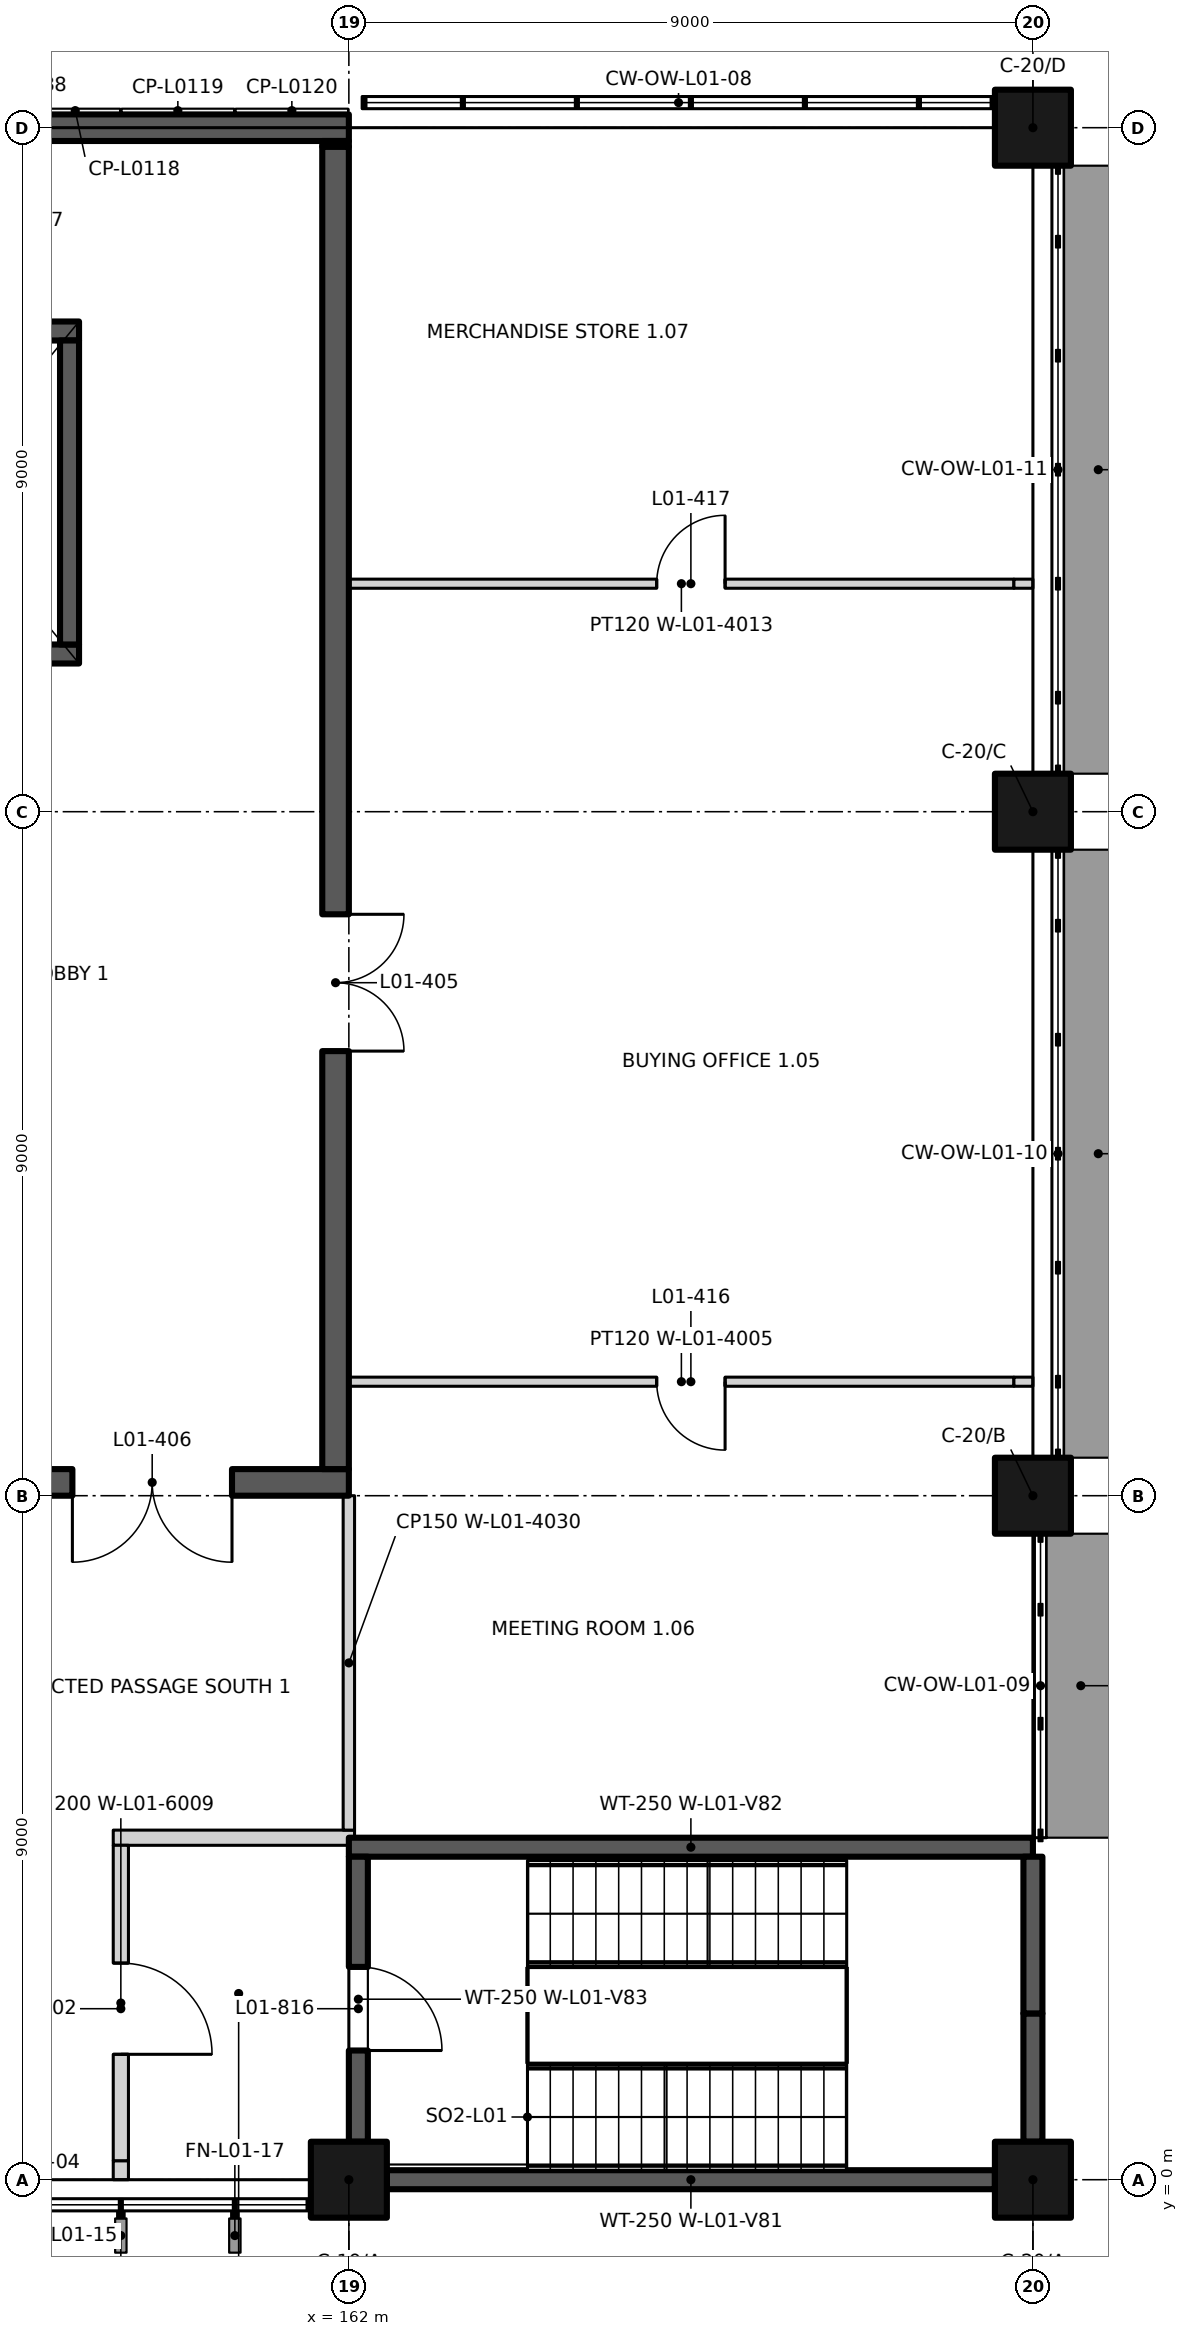
"""IFC4 building model, lengths in metres.
Left out: names, types, materials, properties, quantities, classifications, styles, units other than length and angle.
Written with IfcOpenShell. Run it as: python <this file> out.ifc"""

import sys

from ifc_helpers import new_model, si_unit, direction, frame, frame_2d, origin, origin_2d, place, context, subcontext, project, spatial, rectangle, extrude, element, fill, save


model = new_model("IFC4")
c1 = context("Model", 3, precision=1e-05, world=origin(), true_north=direction((0.0, 1.0)))
c2 = subcontext(c1, "Body", "Model", "MODEL_VIEW")
j1 = project(units=[si_unit("LENGTHUNIT", "METRE"), si_unit("PLANEANGLEUNIT", "RADIAN")], contexts=[c1])
p1 = place(None, origin())
s1 = spatial("IfcSite", under=j1, at=p1, CompositionType="ELEMENT")
p2 = place(p1, origin())
s2 = spatial("IfcBuilding", under=s1, at=p2, CompositionType="ELEMENT")
p3 = place(p2, frame((0.0, 0.0, 6.0)))
s3 = spatial("IfcBuildingStorey", under=s2, at=p3, CompositionType="ELEMENT", Elevation=6.0)
for number, where, z_axis, x_axis in (
    (1, (162.0, 0.0, 0.0), (0.0, 0.0, 1.0), (1.0, 0.0, 0.0)),
    (2, (171.0, 0.0, 0.0), (0.0, 0.0, 1.0), (1.0, 0.0, 0.0)),
    (3, (171.0, 9.0, 0.0), (0.0, 0.0, 1.0), (1.0, 0.0, 0.0)),
    (4, (171.0, 18.0, 0.0), (0.0, 0.0, 1.0), (1.0, 0.0, 0.0)),
    (5, (171.0, 27.0, 0.0), (0.0, 0.0, 1.0), (1.0, 0.0, 0.0)),
):
    element("IfcColumn", number, at=place(p3, frame(where, z_axis=z_axis, x_axis=x_axis)), inside=s3, PredefinedType="COLUMN", context=c2, shape_type="SweptSolid", body=[
        extrude(rectangle(XDim=1.0, YDim=1.0, at=origin_2d()), origin(), (0.0, 0.0, 1.0), 4.5),
    ])
p4 = place(p3, frame((162.5, 0.0, 0.0), z_axis=(0.0, 0.0, 1.0), x_axis=(1.0, 0.0, 0.0)))
e6 = element("IfcWall", 6, at=p4, inside=s3, PredefinedType="SHEAR", context=c2, shape_type="SweptSolid", body=[
    extrude(rectangle(XDim=8.0, YDim=0.25, at=frame_2d((4.0, 0.0))), origin(), (0.0, 0.0, 1.0), 4.5),
])
p5 = place(p3, frame((162.0, 4.375, 0.0), z_axis=(0.0, 0.0, 1.0), x_axis=(1.0, 0.0, 0.0)))
e7 = element("IfcWall", 7, at=p5, inside=s3, PredefinedType="SHEAR", context=c2, shape_type="SweptSolid", body=[
    extrude(rectangle(XDim=9.0, YDim=0.25, at=frame_2d((4.5, 0.0))), origin(), (0.0, 0.0, 1.0), 4.5),
])
p6 = place(p3, frame((162.125, 0.5, 0.0), z_axis=(0.0, 0.0, 1.0), x_axis=(0.0, 1.0, 0.0)))
e8 = element("IfcWall", 8, at=p6, inside=s3, PredefinedType="SHEAR", context=c2, shape_type="SweptSolid", body=[
    extrude(rectangle(XDim=3.75, YDim=0.25, at=frame_2d((1.875, 0.0))), origin(), (0.0, 0.0, 1.0), 4.5),
])
p7 = place(p6, frame((2.3, 0.0, 0.0), z_axis=(0.0, 0.0, 1.0), x_axis=(-1.0, 0.0, 0.0)))
e9 = element("IfcOpeningElement", 9, at=p7, cuts=e8, PredefinedType="OPENING", context=c2, shape_type="SweptSolid", body=[
    extrude(rectangle(XDim=1.1, YDim=2.1, at=frame_2d((0.55, 1.05))), frame((0.0, 0.135, 0.0), z_axis=(0.0, -1.0, 0.0), x_axis=(1.0, 0.0, 0.0)), (0.0, 0.0, 1.0), 0.27),
])
p8 = place(p3, frame((171.0, 0.5, 0.0), z_axis=(0.0, 0.0, 1.0), x_axis=(0.0, 1.0, 0.0)))
e10 = element("IfcWall", 10, at=p8, inside=s3, PredefinedType="SHEAR", context=c2, shape_type="SweptSolid", body=[
    extrude(rectangle(XDim=1.688, YDim=0.25, at=frame_2d((0.844, 0.0))), origin(), (0.0, 0.0, 1.0), 4.5),
])
p9 = place(p3, frame((171.0, 2.188, 0.0), z_axis=(0.0, 0.0, 1.0), x_axis=(0.0, 1.0, 0.0)))
e11 = element("IfcWall", 11, at=p9, inside=s3, PredefinedType="SHEAR", context=c2, shape_type="SweptSolid", body=[
    extrude(rectangle(XDim=2.062, YDim=0.25, at=frame_2d((1.031, 0.0))), origin(), (0.0, 0.0, 1.0), 4.5),
])
p10 = place(p3, frame((154.75, 20.075, 0.0), z_axis=(0.0, 0.0, 1.0), x_axis=(1.0, 0.0, 0.0)))
e12 = element("IfcWall", 12, at=p10, inside=s3, PredefinedType="SHEAR", context=c2, shape_type="SweptSolid", body=[
    extrude(rectangle(XDim=3.7, YDim=0.25, at=frame_2d((1.85, 0.0))), origin(), (0.0, 0.0, 1.0), 4.5),
])
p11 = place(p10, frame((1.15, 0.0, 0.0)))
e13 = element("IfcOpeningElement", 13, at=p11, cuts=e12, PredefinedType="OPENING", context=c2, shape_type="SweptSolid", body=[
    extrude(rectangle(XDim=1.4, YDim=2.1, at=frame_2d((0.7, 1.05))), frame((0.0, 0.135, 0.0), z_axis=(0.0, -1.0, 0.0), x_axis=(1.0, 0.0, 0.0)), (0.0, 0.0, 1.0), 0.27),
])
p12 = place(p3, frame((154.75, 24.325, 0.0), z_axis=(0.0, 0.0, 1.0), x_axis=(1.0, 0.0, 0.0)))
e14 = element("IfcWall", 14, at=p12, inside=s3, PredefinedType="SHEAR", context=c2, shape_type="SweptSolid", body=[
    extrude(rectangle(XDim=3.7, YDim=0.25, at=frame_2d((1.85, 0.0))), origin(), (0.0, 0.0, 1.0), 4.5),
])
p13 = place(p3, frame((158.325, 20.2, 0.0), z_axis=(0.0, 0.0, 1.0), x_axis=(0.0, 1.0, 0.0)))
e15 = element("IfcWall", 15, at=p13, inside=s3, PredefinedType="SHEAR", context=c2, shape_type="SweptSolid", body=[
    extrude(rectangle(XDim=4.0, YDim=0.25, at=frame_2d((2.0, 0.0))), origin(), (0.0, 0.0, 1.0), 4.5),
])
p14 = place(p3, frame((144.0, 27.0, 0.0), z_axis=(0.0, 0.0, 1.0), x_axis=(1.0, 0.0, 0.0)))
e16 = element("IfcWall", 16, at=p14, inside=s3, PredefinedType="SOLIDWALL", context=c2, shape_type="SweptSolid", body=[
    extrude(rectangle(XDim=18.0, YDim=0.35, at=frame_2d((9.0, 0.0))), origin(), (0.0, 0.0, 1.0), 3.6),
])
p15 = place(p14, frame((4.2, 0.0, 0.6)))
e17 = element("IfcOpeningElement", 17, at=p15, cuts=e16, PredefinedType="OPENING", context=c2, shape_type="SweptSolid", body=[
    extrude(rectangle(XDim=0.6, YDim=2.4, at=frame_2d((0.3, 1.2))), frame((0.0, 0.185, 0.0), z_axis=(0.0, -1.0, 0.0), x_axis=(1.0, 0.0, 0.0)), (0.0, 0.0, 1.0), 0.37),
])
p16 = place(p14, frame((13.2, 0.0, 0.6)))
e18 = element("IfcOpeningElement", 18, at=p16, cuts=e16, PredefinedType="OPENING", context=c2, shape_type="SweptSolid", body=[
    extrude(rectangle(XDim=0.6, YDim=2.4, at=frame_2d((0.3, 1.2))), frame((0.0, 0.185, 0.0), z_axis=(0.0, -1.0, 0.0), x_axis=(1.0, 0.0, 0.0)), (0.0, 0.0, 1.0), 0.37),
])
p17 = place(p3, frame((158.9, 4.5, 0.0), z_axis=(0.0, 0.0, 1.0), x_axis=(1.0, 0.0, 0.0)))
e19 = element("IfcWall", 19, at=p17, inside=s3, PredefinedType="PARTITIONING", context=c2, shape_type="SweptSolid", body=[
    extrude(rectangle(XDim=3.175, YDim=0.2, at=frame_2d((1.587, 0.0))), origin(), (0.0, 0.0, 1.0), 4.2),
])
p18 = place(p3, frame((144.0, 9.175, 0.0), z_axis=(0.0, 0.0, 1.0), x_axis=(1.0, 0.0, 0.0)))
e20 = element("IfcWall", 20, at=p18, inside=s3, PredefinedType="SHEAR", context=c2, shape_type="SweptSolid", body=[
    extrude(rectangle(XDim=18.0, YDim=0.35, at=frame_2d((9.0, 0.0))), origin(), (0.0, 0.0, 1.0), 4.2),
])
p19 = place(p18, frame((16.463, 0.0, 0.0), z_axis=(0.0, 0.0, 1.0), x_axis=(-1.0, 0.0, 0.0)))
e21 = element("IfcOpeningElement", 21, at=p19, cuts=e20, PredefinedType="OPENING", context=c2, shape_type="SweptSolid", body=[
    extrude(rectangle(XDim=2.1, YDim=2.4, at=frame_2d((1.05, 1.2))), frame((0.0, 0.185, 0.0), z_axis=(0.0, -1.0, 0.0), x_axis=(1.0, 0.0, 0.0)), (0.0, 0.0, 1.0), 0.37),
])
p20 = place(p3, frame((162.0, 10.5, 0.0), z_axis=(0.0, 0.0, 1.0), x_axis=(1.0, 0.0, 0.0)))
e22 = element("IfcWall", 22, at=p20, inside=s3, PredefinedType="PARTITIONING", context=c2, shape_type="SweptSolid", body=[
    extrude(rectangle(XDim=8.75, YDim=0.12, at=frame_2d((4.375, 0.0))), origin(), (0.0, 0.0, 1.0), 4.2),
])
p21 = place(p20, frame((4.95, 0.0, 0.0), z_axis=(0.0, 0.0, 1.0), x_axis=(-1.0, 0.0, 0.0)))
e23 = element("IfcOpeningElement", 23, at=p21, cuts=e22, PredefinedType="OPENING", context=c2, shape_type="SweptSolid", body=[
    extrude(rectangle(XDim=0.9, YDim=2.1, at=frame_2d((0.45, 1.05))), frame((0.0, 0.07, 0.0), z_axis=(0.0, -1.0, 0.0), x_axis=(1.0, 0.0, 0.0)), (0.0, 0.0, 1.0), 0.14),
])
p22 = place(p3, frame((170.75, 10.5, 0.0), z_axis=(0.0, 0.0, 1.0), x_axis=(1.0, 0.0, 0.0)))
e24 = element("IfcWall", 24, at=p22, inside=s3, PredefinedType="PARTITIONING", context=c2, shape_type="SweptSolid", body=[
    extrude(rectangle(XDim=0.25, YDim=0.12, at=frame_2d((0.125, 0.0))), origin(), (0.0, 0.0, 1.0), 3.6),
])
p23 = place(p3, frame((162.0, 21.0, 0.0), z_axis=(0.0, 0.0, 1.0), x_axis=(1.0, 0.0, 0.0)))
e25 = element("IfcWall", 25, at=p23, inside=s3, PredefinedType="PARTITIONING", context=c2, shape_type="SweptSolid", body=[
    extrude(rectangle(XDim=8.75, YDim=0.12, at=frame_2d((4.375, 0.0))), origin(), (0.0, 0.0, 1.0), 4.2),
])
p24 = place(p23, frame((4.05, 0.0, 0.0)))
e26 = element("IfcOpeningElement", 26, at=p24, cuts=e25, PredefinedType="OPENING", context=c2, shape_type="SweptSolid", body=[
    extrude(rectangle(XDim=0.9, YDim=2.1, at=frame_2d((0.45, 1.05))), frame((0.0, 0.07, 0.0), z_axis=(0.0, -1.0, 0.0), x_axis=(1.0, 0.0, 0.0)), (0.0, 0.0, 1.0), 0.14),
])
p25 = place(p3, frame((170.75, 21.0, 0.0), z_axis=(0.0, 0.0, 1.0), x_axis=(1.0, 0.0, 0.0)))
e27 = element("IfcWall", 27, at=p25, inside=s3, PredefinedType="PARTITIONING", context=c2, shape_type="SweptSolid", body=[
    extrude(rectangle(XDim=0.25, YDim=0.12, at=frame_2d((0.125, 0.0))), origin(), (0.0, 0.0, 1.0), 3.6),
])
p26 = place(p3, frame((159.0, 0.0, 0.0), z_axis=(0.0, 0.0, 1.0), x_axis=(0.0, 1.0, 0.0)))
e28 = element("IfcWall", 28, at=p26, inside=s3, PredefinedType="PARTITIONING", context=c2, shape_type="SweptSolid", body=[
    extrude(rectangle(XDim=0.25, YDim=0.2, at=frame_2d((0.125, 0.0))), origin(), (0.0, 0.0, 1.0), 3.6),
])
p27 = place(p3, frame((159.0, 0.25, 0.0), z_axis=(0.0, 0.0, 1.0), x_axis=(0.0, 1.0, 0.0)))
e29 = element("IfcWall", 29, at=p27, inside=s3, PredefinedType="PARTITIONING", context=c2, shape_type="SweptSolid", body=[
    extrude(rectangle(XDim=4.15, YDim=0.2, at=frame_2d((2.075, 0.0))), origin(), (0.0, 0.0, 1.0), 4.2),
])
p28 = place(p27, frame((2.6, 0.0, 0.0), z_axis=(0.0, 0.0, 1.0), x_axis=(-1.0, 0.0, 0.0)))
e30 = element("IfcOpeningElement", 30, at=p28, cuts=e29, PredefinedType="OPENING", context=c2, shape_type="SweptSolid", body=[
    extrude(rectangle(XDim=1.2, YDim=2.1, at=frame_2d((0.6, 1.05))), frame((0.0, 0.11, 0.0), z_axis=(0.0, -1.0, 0.0), x_axis=(1.0, 0.0, 0.0)), (0.0, 0.0, 1.0), 0.22),
])
p29 = place(p3, frame((161.825, 9.35, 0.0), z_axis=(0.0, 0.0, 1.0), x_axis=(0.0, 1.0, 0.0)))
e31 = element("IfcWall", 31, at=p29, inside=s3, PredefinedType="SHEAR", context=c2, shape_type="SweptSolid", body=[
    extrude(rectangle(XDim=17.4, YDim=0.35, at=frame_2d((8.7, 0.0))), origin(), (0.0, 0.0, 1.0), 4.2),
])
p30 = place(p29, frame((7.3, 0.0, 0.0), z_axis=(0.0, 0.0, 1.0), x_axis=(-1.0, 0.0, 0.0)))
e32 = element("IfcOpeningElement", 32, at=p30, cuts=e31, PredefinedType="OPENING", context=c2, shape_type="SweptSolid", body=[
    extrude(rectangle(XDim=1.8, YDim=2.4, at=frame_2d((0.9, 1.2))), frame((0.0, 0.185, 0.0), z_axis=(0.0, -1.0, 0.0), x_axis=(1.0, 0.0, 0.0)), (0.0, 0.0, 1.0), 0.37),
])
p31 = place(p3, frame((161.825, 26.75, 0.0), z_axis=(0.0, 0.0, 1.0), x_axis=(0.0, 1.0, 0.0)))
e33 = element("IfcWall", 33, at=p31, inside=s3, PredefinedType="SHEAR", context=c2, shape_type="SweptSolid", body=[
    extrude(rectangle(XDim=0.075, YDim=0.35, at=frame_2d((0.038, 0.0))), origin(), (0.0, 0.0, 1.0), 3.6),
])
p32 = place(p3, frame((162.0, 4.6, 0.0), z_axis=(0.0, 0.0, 1.0), x_axis=(0.0, 1.0, 0.0)))
e34 = element("IfcWall", 34, at=p32, inside=s3, PredefinedType="PARTITIONING", context=c2, shape_type="SweptSolid", body=[
    extrude(rectangle(XDim=4.4, YDim=0.15, at=frame_2d((2.2, 0.0))), origin(), (0.0, 0.0, 1.0), 4.2),
])
p33 = place(p7, origin())
e35 = element("IfcDoor", 35, at=p33, inside=s3, OperationType="SINGLE_SWING_RIGHT", PredefinedType="DOOR", context=c2, shape_type="SweptSolid", body=[
    extrude(rectangle(XDim=1.1, YDim=2.1, at=frame_2d((0.55, 1.05))), frame((0.0, 0.025, 0.0), z_axis=(0.0, -1.0, 0.0), x_axis=(1.0, 0.0, 0.0)), (0.0, 0.0, 1.0), 0.05),
])
fill(e9, e35)
p34 = place(p28, origin())
e36 = element("IfcDoor", 36, at=p34, inside=s3, OperationType="SINGLE_SWING_RIGHT", PredefinedType="DOOR", context=c2, shape_type="SweptSolid", body=[
    extrude(rectangle(XDim=1.2, YDim=2.1, at=frame_2d((0.6, 1.05))), frame((0.0, 0.025, 0.0), z_axis=(0.0, -1.0, 0.0), x_axis=(1.0, 0.0, 0.0)), (0.0, 0.0, 1.0), 0.05),
])
fill(e30, e36)
p35 = place(p30, origin())
e37 = element("IfcDoor", 37, at=p35, inside=s3, OperationType="DOUBLE_DOOR_SINGLE_SWING", PredefinedType="DOOR", context=c2, shape_type="SweptSolid", body=[
    extrude(rectangle(XDim=1.8, YDim=2.4, at=frame_2d((0.9, 1.2))), frame((0.0, 0.025, 0.0), z_axis=(0.0, -1.0, 0.0), x_axis=(1.0, 0.0, 0.0)), (0.0, 0.0, 1.0), 0.05),
])
fill(e32, e37)
p36 = place(p19, origin())
e38 = element("IfcDoor", 38, at=p36, inside=s3, OperationType="DOUBLE_DOOR_SINGLE_SWING", PredefinedType="DOOR", context=c2, shape_type="SweptSolid", body=[
    extrude(rectangle(XDim=2.1, YDim=2.4, at=frame_2d((1.05, 1.2))), frame((0.0, 0.025, 0.0), z_axis=(0.0, -1.0, 0.0), x_axis=(1.0, 0.0, 0.0)), (0.0, 0.0, 1.0), 0.05),
])
fill(e21, e38)
p37 = place(p21, origin())
e39 = element("IfcDoor", 39, at=p37, inside=s3, OperationType="SINGLE_SWING_LEFT", PredefinedType="DOOR", context=c2, shape_type="SweptSolid", body=[
    extrude(rectangle(XDim=0.9, YDim=2.1, at=frame_2d((0.45, 1.05))), frame((0.0, 0.025, 0.0), z_axis=(0.0, -1.0, 0.0), x_axis=(1.0, 0.0, 0.0)), (0.0, 0.0, 1.0), 0.05),
])
fill(e23, e39)
p38 = place(p24, origin())
e40 = element("IfcDoor", 40, at=p38, inside=s3, OperationType="SINGLE_SWING_RIGHT", PredefinedType="DOOR", context=c2, shape_type="SweptSolid", body=[
    extrude(rectangle(XDim=0.9, YDim=2.1, at=frame_2d((0.45, 1.05))), frame((0.0, 0.025, 0.0), z_axis=(0.0, -1.0, 0.0), x_axis=(1.0, 0.0, 0.0)), (0.0, 0.0, 1.0), 0.05),
])
fill(e26, e40)
save(model, sys.argv[1])
